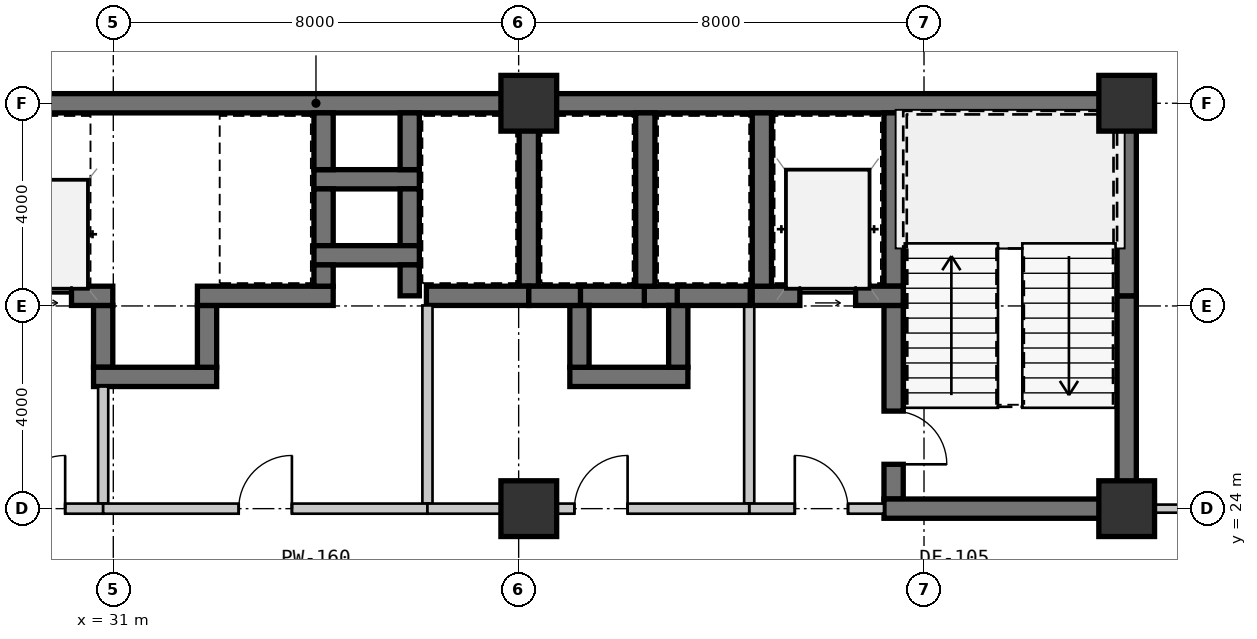
"""IFC4 building model, lengths in metres.
Left out: names, types, materials, properties, quantities, classifications, styles, units other than length and angle.
Written with IfcOpenShell. Run it as: python <this file> out.ifc"""

import sys

from ifc_helpers import new_model, si_unit, direction, frame, frame_2d, origin, origin_2d, place, context, subcontext, project, spatial, rectangle, extrude, source, transform, mapped, element, fill, save


model = new_model("IFC4")
c1 = context("Model", 3, precision=1e-05, world=origin(), true_north=direction((0.0, 1.0)))
c2 = subcontext(c1, "Body", "Model", "MODEL_VIEW")
j1 = project(units=[si_unit("LENGTHUNIT", "METRE"), si_unit("PLANEANGLEUNIT", "RADIAN")], contexts=[c1])
p1 = place(None, origin())
s1 = spatial("IfcSite", under=j1, at=p1, CompositionType="ELEMENT")
p2 = place(p1, origin())
s2 = spatial("IfcBuilding", under=s1, at=p2, CompositionType="ELEMENT")
p3 = place(p2, frame((0.0, 0.0, 16.8)))
s3 = spatial("IfcBuildingStorey", under=s2, at=p3, CompositionType="ELEMENT", Elevation=16.8)
m1 = source(origin(), c2, "Body", "SweptSolid", [
    extrude(rectangle(XDim=1.1, YDim=1.1, at=origin_2d()), origin(), (0.0, 0.0, 1.0), 3.15),
])
for number, where, z_axis, x_axis in (
    (1, (39.2, 24.0, 0.0), (0.0, 0.0, 1.0), (1.0, 0.0, 0.0)),
    (2, (51.0, 24.0, 0.0), (0.0, 0.0, 1.0), (1.0, 0.0, 0.0)),
    (3, (39.2, 32.0, 0.0), (0.0, 0.0, 1.0), (1.0, 0.0, 0.0)),
    (4, (51.0, 32.0, 0.0), (0.0, 0.0, 1.0), (1.0, 0.0, 0.0)),
):
    element("IfcColumn", number, at=place(p3, frame(where, z_axis=z_axis, x_axis=x_axis)), inside=s3, PredefinedType="COLUMN", context=c2, shape_type="MappedRepresentation", body=[
        mapped(m1, transform((0.0, 0.0, 0.0), scale=1.0)),
    ])
m2 = source(origin(), c2, "Body", "SweptSolid", [
    extrude(rectangle(XDim=11.2, YDim=0.38, at=frame_2d((5.6, 0.0))), origin(), (0.0, 0.0, 1.0), 2.93),
])
p4 = place(p3, frame((28.0, 32.0, 0.0), z_axis=(0.0, 0.0, 1.0), x_axis=(1.0, 0.0, 0.0)))
e5 = element("IfcWall", 5, at=p4, inside=s3, PredefinedType="SHEAR", context=c2, shape_type="MappedRepresentation", body=[
    mapped(m2, transform((0.0, 0.0, 0.0), scale=1.0)),
])
m3 = source(origin(), c2, "Body", "SweptSolid", [
    extrude(rectangle(XDim=11.99, YDim=0.38, at=frame_2d((5.995, 0.0))), origin(), (0.0, 0.0, 1.0), 2.93),
])
p5 = place(p3, frame((39.2, 32.0, 0.0), z_axis=(0.0, 0.0, 1.0), x_axis=(1.0, 0.0, 0.0)))
e6 = element("IfcWall", 6, at=p5, inside=s3, PredefinedType="SHEAR", context=c2, shape_type="MappedRepresentation", body=[
    mapped(m3, transform((0.0, 0.0, 0.0), scale=1.0)),
])
m4 = source(origin(), c2, "Body", "SweptSolid", [
    extrude(rectangle(XDim=4.01, YDim=0.38, at=frame_2d((2.005, 0.0))), origin(), (0.0, 0.0, 1.0), 2.93),
])
p6 = place(p3, frame((51.0, 24.19, 0.0), z_axis=(0.0, 0.0, 1.0), x_axis=(0.0, 1.0, 0.0)))
e7 = element("IfcWall", 7, at=p6, inside=s3, PredefinedType="SHEAR", context=c2, shape_type="MappedRepresentation", body=[
    mapped(m4, transform((0.0, 0.0, 0.0), scale=1.0)),
])
m5 = source(origin(), c2, "Body", "SweptSolid", [
    extrude(rectangle(XDim=3.61, YDim=0.38, at=frame_2d((1.805, 0.0))), origin(), (0.0, 0.0, 1.0), 2.93),
])
p7 = place(p3, frame((51.0, 28.2, 0.0), z_axis=(0.0, 0.0, 1.0), x_axis=(0.0, 1.0, 0.0)))
e8 = element("IfcWall", 8, at=p7, inside=s3, PredefinedType="SHEAR", context=c2, shape_type="MappedRepresentation", body=[
    mapped(m5, transform((0.0, 0.0, 0.0), scale=1.0)),
])
m6 = source(origin(), c2, "Body", "SweptSolid", [
    extrude(rectangle(XDim=3.42, YDim=0.38, at=frame_2d((1.71, 0.0))), origin(), (0.0, 0.0, 1.0), 2.93),
])
p8 = place(p3, frame((46.4, 31.81, 0.0), z_axis=(0.0, 0.0, 1.0), x_axis=(0.0, -1.0, 0.0)))
e9 = element("IfcWall", 9, at=p8, inside=s3, PredefinedType="SHEAR", context=c2, shape_type="MappedRepresentation", body=[
    mapped(m6, transform((0.0, 0.0, 0.0), scale=1.0)),
])
m7 = source(origin(), c2, "Body", "SweptSolid", [
    extrude(rectangle(XDim=3.82, YDim=0.38, at=frame_2d((1.91, 0.0))), origin(), (0.0, 0.0, 1.0), 2.93),
])
p9 = place(p3, frame((46.4, 28.01, 0.0), z_axis=(0.0, 0.0, 1.0), x_axis=(0.0, -1.0, 0.0)))
e10 = element("IfcWall", 10, at=p9, inside=s3, PredefinedType="SHEAR", context=c2, shape_type="MappedRepresentation", body=[
    mapped(m7, transform((0.0, 0.0, 0.0), scale=1.0)),
])
m8 = source(origin(), c2, "Body", "SweptSolid", [
    extrude(rectangle(XDim=1.05, YDim=2.1, at=frame_2d((0.525, 1.05))), frame((0.0, 0.2, 0.0), z_axis=(0.0, -1.0, 0.0), x_axis=(1.0, 0.0, 0.0)), (0.0, 0.0, 1.0), 0.4),
])
p10 = place(p9, frame((2.085, 0.0, 0.0)))
e11 = element("IfcOpeningElement", 11, at=p10, cuts=e10, PredefinedType="OPENING", context=c2, shape_type="MappedRepresentation", body=[
    mapped(m8, transform((0.0, 0.0, 0.0), scale=1.0)),
])
m9 = source(origin(), c2, "Body", "SweptSolid", [
    extrude(rectangle(XDim=4.98, YDim=0.38, at=frame_2d((2.49, 0.0))), origin(), (0.0, 0.0, 1.0), 2.93),
])
p11 = place(p3, frame((46.21, 24.0, 0.0), z_axis=(0.0, 0.0, 1.0), x_axis=(1.0, 0.0, 0.0)))
e12 = element("IfcWall", 12, at=p11, inside=s3, PredefinedType="SHEAR", context=c2, shape_type="MappedRepresentation", body=[
    mapped(m9, transform((0.0, 0.0, 0.0), scale=1.0)),
])
m10 = source(origin(), c2, "Body", "SweptSolid", [
    extrude(rectangle(XDim=2.98, YDim=0.38, at=frame_2d((1.49, 0.0))), origin(), (0.0, 0.0, 1.0), 2.93),
])
p12 = place(p3, frame((43.61, 28.2, 0.0), z_axis=(0.0, 0.0, 1.0), x_axis=(1.0, 0.0, 0.0)))
e13 = element("IfcWall", 13, at=p12, inside=s3, PredefinedType="SHEAR", context=c2, shape_type="MappedRepresentation", body=[
    mapped(m10, transform((0.0, 0.0, 0.0), scale=1.0)),
])
m11 = source(origin(), c2, "Body", "SweptSolid", [
    extrude(rectangle(XDim=1.1, YDim=2.15, at=frame_2d((0.55, 1.075))), frame((0.0, 0.2, 0.0), z_axis=(0.0, -1.0, 0.0), x_axis=(1.0, 0.0, 0.0)), (0.0, 0.0, 1.0), 0.4),
])
p13 = place(p12, frame((0.94, 0.0, 0.0)))
e14 = element("IfcOpeningElement", 14, at=p13, cuts=e13, PredefinedType="OPENING", context=c2, shape_type="MappedRepresentation", body=[
    mapped(m11, transform((0.0, 0.0, 0.0), scale=1.0)),
])
p14 = place(p3, frame((43.8, 31.81, 0.0), z_axis=(0.0, 0.0, 1.0), x_axis=(0.0, -1.0, 0.0)))
e15 = element("IfcWall", 15, at=p14, inside=s3, PredefinedType="SHEAR", context=c2, shape_type="MappedRepresentation", body=[
    mapped(m6, transform((0.0, 0.0, 0.0), scale=1.0)),
])
m12 = source(origin(), c2, "Body", "SweptSolid", [
    extrude(rectangle(XDim=3.91, YDim=0.2, at=frame_2d((1.955, 0.0))), origin(), (0.0, 0.0, 1.0), 2.93),
])
p15 = place(p3, frame((43.55, 28.01, 0.0), z_axis=(0.0, 0.0, 1.0), x_axis=(0.0, -1.0, 0.0)))
e16 = element("IfcWall", 16, at=p15, inside=s3, PredefinedType="SOLIDWALL", context=c2, shape_type="MappedRepresentation", body=[
    mapped(m12, transform((0.0, 0.0, 0.0), scale=1.0)),
])
m13 = source(origin(), c2, "Body", "SweptSolid", [
    extrude(rectangle(XDim=2.66, YDim=0.2, at=frame_2d((1.33, 0.0))), origin(), (0.0, 0.0, 1.0), 2.397),
])
p16 = place(p3, frame((43.55, 24.0, 0.0), z_axis=(0.0, 0.0, 1.0), x_axis=(1.0, 0.0, 0.0)))
e17 = element("IfcWall", 17, at=p16, inside=s3, PredefinedType="SOLIDWALL", context=c2, shape_type="MappedRepresentation", body=[
    mapped(m13, transform((0.0, 0.0, 0.0), scale=1.0)),
])
m14 = source(origin(), c2, "Body", "SweptSolid", [
    extrude(rectangle(XDim=1.05, YDim=2.1, at=frame_2d((0.525, 1.05))), frame((0.0, 0.11, 0.0), z_axis=(0.0, -1.0, 0.0), x_axis=(1.0, 0.0, 0.0)), (0.0, 0.0, 1.0), 0.22),
])
p17 = place(p16, frame((0.9, 0.0, 0.0)))
e18 = element("IfcOpeningElement", 18, at=p17, cuts=e17, PredefinedType="OPENING", context=c2, shape_type="MappedRepresentation", body=[
    mapped(m14, transform((0.0, 0.0, 0.0), scale=1.0)),
])
m15 = source(origin(), c2, "Body", "SweptSolid", [
    extrude(rectangle(XDim=2.08, YDim=0.38, at=frame_2d((1.04, 0.0))), origin(), (0.0, 0.0, 1.0), 2.93),
])
p18 = place(p3, frame((34.96, 30.5, 0.0), z_axis=(0.0, 0.0, 1.0), x_axis=(1.0, 0.0, 0.0)))
e19 = element("IfcWall", 19, at=p18, inside=s3, PredefinedType="SHEAR", context=c2, shape_type="MappedRepresentation", body=[
    mapped(m15, transform((0.0, 0.0, 0.0), scale=1.0)),
])
m16 = source(origin(), c2, "Body", "SweptSolid", [
    extrude(rectangle(XDim=1.12, YDim=0.38, at=frame_2d((0.56, 0.0))), origin(), (0.0, 0.0, 1.0), 2.93),
])
for number, where, z_axis, x_axis in (
    (20, (35.15, 31.81, 0.0), (0.0, 0.0, 1.0), (0.0, -1.0, 0.0)),
    (21, (36.85, 30.69, 0.0), (0.0, 0.0, 1.0), (0.0, 1.0, 0.0)),
    (22, (35.15, 30.31, 0.0), (0.0, 0.0, 1.0), (0.0, -1.0, 0.0)),
    (23, (36.85, 29.19, 0.0), (0.0, 0.0, 1.0), (0.0, 1.0, 0.0)),
):
    element("IfcWall", number, at=place(p3, frame(where, z_axis=z_axis, x_axis=x_axis)), inside=s3, PredefinedType="SHEAR", context=c2, shape_type="MappedRepresentation", body=[
        mapped(m16, transform((0.0, 0.0, 0.0), scale=1.0)),
    ])
p19 = place(p3, frame((34.96, 29.0, 0.0), z_axis=(0.0, 0.0, 1.0), x_axis=(1.0, 0.0, 0.0)))
e24 = element("IfcWall", 24, at=p19, inside=s3, PredefinedType="SHEAR", context=c2, shape_type="MappedRepresentation", body=[
    mapped(m15, transform((0.0, 0.0, 0.0), scale=1.0)),
])
m17 = source(origin(), c2, "Body", "SweptSolid", [
    extrude(rectangle(XDim=1.22, YDim=0.38, at=frame_2d((0.61, 0.0))), origin(), (0.0, 0.0, 1.0), 2.93),
])
p20 = place(p3, frame((30.8, 28.01, 0.0), z_axis=(0.0, 0.0, 1.0), x_axis=(0.0, -1.0, 0.0)))
e25 = element("IfcWall", 25, at=p20, inside=s3, PredefinedType="SHEAR", context=c2, shape_type="MappedRepresentation", body=[
    mapped(m17, transform((0.0, 0.0, 0.0), scale=1.0)),
])
m18 = source(origin(), c2, "Body", "SweptSolid", [
    extrude(rectangle(XDim=2.43, YDim=0.38, at=frame_2d((1.215, 0.0))), origin(), (0.0, 0.0, 1.0), 2.93),
])
p21 = place(p3, frame((30.61, 26.6, 0.0), z_axis=(0.0, 0.0, 1.0), x_axis=(1.0, 0.0, 0.0)))
e26 = element("IfcWall", 26, at=p21, inside=s3, PredefinedType="SHEAR", context=c2, shape_type="MappedRepresentation", body=[
    mapped(m18, transform((0.0, 0.0, 0.0), scale=1.0)),
])
p22 = place(p3, frame((32.85, 26.79, 0.0), z_axis=(0.0, 0.0, 1.0), x_axis=(0.0, 1.0, 0.0)))
e27 = element("IfcWall", 27, at=p22, inside=s3, PredefinedType="SHEAR", context=c2, shape_type="MappedRepresentation", body=[
    mapped(m17, transform((0.0, 0.0, 0.0), scale=1.0)),
])
m19 = source(origin(), c2, "Body", "SweptSolid", [
    extrude(rectangle(XDim=1.32, YDim=0.38, at=frame_2d((0.66, 0.0))), origin(), (0.0, 0.0, 1.0), 2.93),
])
p23 = place(p3, frame((41.52, 28.2, 0.0), z_axis=(0.0, 0.0, 1.0), x_axis=(-1.0, 0.0, 0.0)))
e28 = element("IfcWall", 28, at=p23, inside=s3, PredefinedType="SHEAR", context=c2, shape_type="MappedRepresentation", body=[
    mapped(m19, transform((0.0, 0.0, 0.0), scale=1.0)),
])
m20 = source(origin(), c2, "Body", "SweptSolid", [
    extrude(rectangle(XDim=0.67, YDim=0.38, at=frame_2d((0.335, 0.0))), origin(), (0.0, 0.0, 1.0), 2.93),
])
p24 = place(p3, frame((42.15, 28.2, 0.0), z_axis=(0.0, 0.0, 1.0), x_axis=(-1.0, 0.0, 0.0)))
e29 = element("IfcWall", 29, at=p24, inside=s3, PredefinedType="SHEAR", context=c2, shape_type="MappedRepresentation", body=[
    mapped(m20, transform((0.0, 0.0, 0.0), scale=1.0)),
])
m21 = source(origin(), c2, "Body", "SweptSolid", [
    extrude(rectangle(XDim=2.33, YDim=0.38, at=frame_2d((1.165, 0.0))), origin(), (0.0, 0.0, 1.0), 2.93),
])
p25 = place(p3, frame((40.01, 26.6, 0.0), z_axis=(0.0, 0.0, 1.0), x_axis=(1.0, 0.0, 0.0)))
e30 = element("IfcWall", 30, at=p25, inside=s3, PredefinedType="SHEAR", context=c2, shape_type="MappedRepresentation", body=[
    mapped(m21, transform((0.0, 0.0, 0.0), scale=1.0)),
])
for number, where, z_axis, x_axis in (
    (31, (40.2, 28.01, 0.0), (0.0, 0.0, 1.0), (0.0, -1.0, 0.0)),
    (32, (42.15, 26.79, 0.0), (0.0, 0.0, 1.0), (0.0, 1.0, 0.0)),
):
    element("IfcWall", number, at=place(p3, frame(where, z_axis=z_axis, x_axis=x_axis)), inside=s3, PredefinedType="SHEAR", context=c2, shape_type="MappedRepresentation", body=[
        mapped(m17, transform((0.0, 0.0, 0.0), scale=1.0)),
    ])
m22 = source(origin(), c2, "Body", "SweptSolid", [
    extrude(rectangle(XDim=2.49, YDim=0.38, at=frame_2d((1.245, 0.0))), origin(), (0.0, 0.0, 1.0), 2.93),
])
p26 = place(p3, frame((28.5, 28.2, 0.0), z_axis=(0.0, 0.0, 1.0), x_axis=(1.0, 0.0, 0.0)))
e33 = element("IfcWall", 33, at=p26, inside=s3, PredefinedType="SHEAR", context=c2, shape_type="MappedRepresentation", body=[
    mapped(m22, transform((0.0, 0.0, 0.0), scale=1.0)),
])
m23 = source(origin(), c2, "Body", "SweptSolid", [
    extrude(rectangle(XDim=1.05, YDim=2.15, at=frame_2d((0.525, 1.075))), frame((0.0, 0.2, 0.0), z_axis=(0.0, -1.0, 0.0), x_axis=(1.0, 0.0, 0.0)), (0.0, 0.0, 1.0), 0.4),
])
p27 = place(p26, frame((0.625, 0.0, 0.0)))
e34 = element("IfcOpeningElement", 34, at=p27, cuts=e33, PredefinedType="OPENING", context=c2, shape_type="MappedRepresentation", body=[
    mapped(m23, transform((0.0, 0.0, 0.0), scale=1.0)),
])
m24 = source(origin(), c2, "Body", "SweptSolid", [
    extrude(rectangle(XDim=2.31, YDim=0.2, at=frame_2d((1.155, 0.0))), origin(), (0.0, 0.0, 1.0), 2.93),
])
p28 = place(p3, frame((30.8, 26.41, 0.0), z_axis=(0.0, 0.0, 1.0), x_axis=(0.0, -1.0, 0.0)))
e35 = element("IfcWall", 35, at=p28, inside=s3, PredefinedType="SOLIDWALL", context=c2, shape_type="MappedRepresentation", body=[
    mapped(m24, transform((0.0, 0.0, 0.0), scale=1.0)),
])
m25 = source(origin(), c2, "Body", "SweptSolid", [
    extrude(rectangle(XDim=4.35, YDim=0.2, at=frame_2d((2.175, 0.0))), origin(), (0.0, 0.0, 1.0), 2.47),
])
p29 = place(p3, frame((30.8, 24.0, 0.0), z_axis=(0.0, 0.0, 1.0), x_axis=(-1.0, 0.0, 0.0)))
e36 = element("IfcWall", 36, at=p29, inside=s3, PredefinedType="SOLIDWALL", context=c2, shape_type="MappedRepresentation", body=[
    mapped(m25, transform((0.0, 0.0, 0.0), scale=1.0)),
])
p30 = place(p29, frame((0.75, 0.0, 0.0)))
e37 = element("IfcOpeningElement", 37, at=p30, cuts=e36, PredefinedType="OPENING", context=c2, shape_type="MappedRepresentation", body=[
    mapped(m14, transform((0.0, 0.0, 0.0), scale=1.0)),
])
m26 = source(origin(), c2, "Body", "SweptSolid", [
    extrude(rectangle(XDim=2.68, YDim=0.38, at=frame_2d((1.34, 0.0))), origin(), (0.0, 0.0, 1.0), 2.93),
])
p31 = place(p3, frame((32.66, 28.2, 0.0), z_axis=(0.0, 0.0, 1.0), x_axis=(1.0, 0.0, 0.0)))
e38 = element("IfcWall", 38, at=p31, inside=s3, PredefinedType="SHEAR", context=c2, shape_type="MappedRepresentation", body=[
    mapped(m26, transform((0.0, 0.0, 0.0), scale=1.0)),
])
m27 = source(origin(), c2, "Body", "SweptSolid", [
    extrude(rectangle(XDim=0.42, YDim=0.38, at=frame_2d((0.21, 0.0))), origin(), (0.0, 0.0, 1.0), 2.93),
])
p32 = place(p3, frame((35.15, 28.39, 0.0), z_axis=(0.0, 0.0, 1.0), x_axis=(0.0, 1.0, 0.0)))
e39 = element("IfcWall", 39, at=p32, inside=s3, PredefinedType="SHEAR", context=c2, shape_type="MappedRepresentation", body=[
    mapped(m27, transform((0.0, 0.0, 0.0), scale=1.0)),
])
p33 = place(p3, frame((39.2, 28.39, 0.0), z_axis=(0.0, 0.0, 1.0), x_axis=(0.0, 1.0, 0.0)))
e40 = element("IfcWall", 40, at=p33, inside=s3, PredefinedType="SHEAR", context=c2, shape_type="MappedRepresentation", body=[
    mapped(m6, transform((0.0, 0.0, 0.0), scale=1.0)),
])
m28 = source(origin(), c2, "Body", "SweptSolid", [
    extrude(rectangle(XDim=0.61, YDim=0.38, at=frame_2d((0.305, 0.0))), origin(), (0.0, 0.0, 1.0), 2.93),
])
p34 = place(p3, frame((36.85, 28.81, 0.0), z_axis=(0.0, 0.0, 1.0), x_axis=(0.0, -1.0, 0.0)))
e41 = element("IfcWall", 41, at=p34, inside=s3, PredefinedType="SHEAR", context=c2, shape_type="MappedRepresentation", body=[
    mapped(m28, transform((0.0, 0.0, 0.0), scale=1.0)),
])
m29 = source(origin(), c2, "Body", "SweptSolid", [
    extrude(rectangle(XDim=2.02, YDim=0.38, at=frame_2d((1.01, 0.0))), origin(), (0.0, 0.0, 1.0), 2.93),
])
p35 = place(p3, frame((37.18, 28.2, 0.0), z_axis=(0.0, 0.0, 1.0), x_axis=(1.0, 0.0, 0.0)))
e42 = element("IfcWall", 42, at=p35, inside=s3, PredefinedType="SHEAR", context=c2, shape_type="MappedRepresentation", body=[
    mapped(m29, transform((0.0, 0.0, 0.0), scale=1.0)),
])
p36 = place(p3, frame((41.5, 28.39, 0.0), z_axis=(0.0, 0.0, 1.0), x_axis=(0.0, 1.0, 0.0)))
e43 = element("IfcWall", 43, at=p36, inside=s3, PredefinedType="SHEAR", context=c2, shape_type="MappedRepresentation", body=[
    mapped(m6, transform((0.0, 0.0, 0.0), scale=1.0)),
])
m30 = source(origin(), c2, "Body", "SweptSolid", [
    extrude(rectangle(XDim=1.02, YDim=0.38, at=frame_2d((0.51, 0.0))), origin(), (0.0, 0.0, 1.0), 2.93),
])
p37 = place(p3, frame((39.2, 28.2, 0.0), z_axis=(0.0, 0.0, 1.0), x_axis=(1.0, 0.0, 0.0)))
e44 = element("IfcWall", 44, at=p37, inside=s3, PredefinedType="SHEAR", context=c2, shape_type="MappedRepresentation", body=[
    mapped(m30, transform((0.0, 0.0, 0.0), scale=1.0)),
])
m31 = source(origin(), c2, "Body", "SweptSolid", [
    extrude(rectangle(XDim=1.44, YDim=0.38, at=frame_2d((0.72, 0.0))), origin(), (0.0, 0.0, 1.0), 2.93),
])
p38 = place(p3, frame((42.13, 28.2, 0.0), z_axis=(0.0, 0.0, 1.0), x_axis=(1.0, 0.0, 0.0)))
e45 = element("IfcWall", 45, at=p38, inside=s3, PredefinedType="SHEAR", context=c2, shape_type="MappedRepresentation", body=[
    mapped(m31, transform((0.0, 0.0, 0.0), scale=1.0)),
])
p39 = place(p3, frame((37.2, 28.01, 0.0), z_axis=(0.0, 0.0, 1.0), x_axis=(0.0, -1.0, 0.0)))
e46 = element("IfcWall", 46, at=p39, inside=s3, PredefinedType="SOLIDWALL", context=c2, shape_type="MappedRepresentation", body=[
    mapped(m12, transform((0.0, 0.0, 0.0), scale=1.0)),
])
m32 = source(origin(), c2, "Body", "SweptSolid", [
    extrude(rectangle(XDim=6.4, YDim=0.2, at=frame_2d((3.2, 0.0))), origin(), (0.0, 0.0, 1.0), 2.47),
])
p40 = place(p3, frame((37.2, 24.0, 0.0), z_axis=(0.0, 0.0, 1.0), x_axis=(-1.0, 0.0, 0.0)))
e47 = element("IfcWall", 47, at=p40, inside=s3, PredefinedType="SOLIDWALL", context=c2, shape_type="MappedRepresentation", body=[
    mapped(m32, transform((0.0, 0.0, 0.0), scale=1.0)),
])
p41 = place(p40, frame((2.675, 0.0, 0.0)))
e48 = element("IfcOpeningElement", 48, at=p41, cuts=e47, PredefinedType="OPENING", context=c2, shape_type="MappedRepresentation", body=[
    mapped(m14, transform((0.0, 0.0, 0.0), scale=1.0)),
])
m33 = source(origin(), c2, "Body", "SweptSolid", [
    extrude(rectangle(XDim=4.35, YDim=0.2, at=frame_2d((2.175, 0.0))), origin(), (0.0, 0.0, 1.0), 2.397),
])
p42 = place(p3, frame((43.55, 24.0, 0.0), z_axis=(0.0, 0.0, 1.0), x_axis=(-1.0, 0.0, 0.0)))
e49 = element("IfcWall", 49, at=p42, inside=s3, PredefinedType="SOLIDWALL", context=c2, shape_type="MappedRepresentation", body=[
    mapped(m33, transform((0.0, 0.0, 0.0), scale=1.0)),
])
p43 = place(p42, frame((2.4, 0.0, 0.0)))
e50 = element("IfcOpeningElement", 50, at=p43, cuts=e49, PredefinedType="OPENING", context=c2, shape_type="MappedRepresentation", body=[
    mapped(m14, transform((0.0, 0.0, 0.0), scale=1.0)),
])
m34 = source(origin(), c2, "Body", "SweptSolid", [
    extrude(rectangle(XDim=2.0, YDim=0.2, at=frame_2d((1.0, 0.0))), origin(), (0.0, 0.0, 1.0), 2.47),
])
p44 = place(p3, frame((39.2, 24.0, 0.0), z_axis=(0.0, 0.0, 1.0), x_axis=(-1.0, 0.0, 0.0)))
e51 = element("IfcWall", 51, at=p44, inside=s3, PredefinedType="SOLIDWALL", context=c2, shape_type="MappedRepresentation", body=[
    mapped(m34, transform((0.0, 0.0, 0.0), scale=1.0)),
])
m35 = source(origin(), c2, "Body", "SweptSolid", [
    extrude(rectangle(XDim=4.13, YDim=0.16, at=frame_2d((2.065, 0.0))), origin(), (0.0, 0.0, 1.0), 2.93),
])
p45 = place(p3, frame((51.19, 24.0, 0.0), z_axis=(0.0, 0.0, 1.0), x_axis=(1.0, 0.0, 0.0)))
e52 = element("IfcWall", 52, at=p45, inside=s3, PredefinedType="PARTITIONING", context=c2, shape_type="MappedRepresentation", body=[
    mapped(m35, transform((0.0, 0.0, 0.0), scale=1.0)),
])
m36 = source(origin(), c2, "Body", "SweptSolid", [
    extrude(rectangle(XDim=1.05, YDim=2.1, at=frame_2d((0.525, 1.05))), frame((0.0, 0.025, 0.0), z_axis=(0.0, -1.0, 0.0), x_axis=(1.0, 0.0, 0.0)), (0.0, 0.0, 1.0), 0.05),
])
p46 = place(p10, origin())
e53 = element("IfcDoor", 53, at=p46, inside=s3, OperationType="SINGLE_SWING_RIGHT", PredefinedType="DOOR", context=c2, shape_type="MappedRepresentation", body=[
    mapped(m36, transform((0.0, 0.0, 0.0), scale=1.0)),
])
fill(e11, e53)
m37 = source(origin(), c2, "Body", "SweptSolid", [
    extrude(rectangle(XDim=1.1, YDim=2.15, at=frame_2d((0.55, 1.075))), frame((0.0, 0.025, 0.0), z_axis=(0.0, -1.0, 0.0), x_axis=(1.0, 0.0, 0.0)), (0.0, 0.0, 1.0), 0.05),
])
p47 = place(p13, origin())
e54 = element("IfcDoor", 54, at=p47, inside=s3, OperationType="SLIDING_TO_LEFT", PredefinedType="DOOR", context=c2, shape_type="MappedRepresentation", body=[
    mapped(m37, transform((0.0, 0.0, 0.0), scale=1.0)),
])
fill(e14, e54)
p48 = place(p17, origin())
e55 = element("IfcDoor", 55, at=p48, inside=s3, OperationType="SINGLE_SWING_LEFT", PredefinedType="DOOR", context=c2, shape_type="MappedRepresentation", body=[
    mapped(m36, transform((0.0, 0.0, 0.0), scale=1.0)),
])
fill(e18, e55)
m38 = source(origin(), c2, "Body", "SweptSolid", [
    extrude(rectangle(XDim=1.05, YDim=2.15, at=frame_2d((0.525, 1.075))), frame((0.0, 0.025, 0.0), z_axis=(0.0, -1.0, 0.0), x_axis=(1.0, 0.0, 0.0)), (0.0, 0.0, 1.0), 0.05),
])
p49 = place(p27, origin())
e56 = element("IfcDoor", 56, at=p49, inside=s3, OperationType="SLIDING_TO_LEFT", PredefinedType="DOOR", context=c2, shape_type="MappedRepresentation", body=[
    mapped(m38, transform((0.0, 0.0, 0.0), scale=1.0)),
])
fill(e34, e56)
p50 = place(p30, frame((1.05, 0.0, 0.0), z_axis=(0.0, 0.0, 1.0), x_axis=(-1.0, 0.0, 0.0)))
e57 = element("IfcDoor", 57, at=p50, inside=s3, OperationType="SINGLE_SWING_RIGHT", PredefinedType="DOOR", context=c2, shape_type="MappedRepresentation", body=[
    mapped(m36, transform((0.0, 0.0, 0.0), scale=1.0)),
])
fill(e37, e57)
p51 = place(p41, frame((1.05, 0.0, 0.0), z_axis=(0.0, 0.0, 1.0), x_axis=(-1.0, 0.0, 0.0)))
e58 = element("IfcDoor", 58, at=p51, inside=s3, OperationType="SINGLE_SWING_RIGHT", PredefinedType="DOOR", context=c2, shape_type="MappedRepresentation", body=[
    mapped(m36, transform((0.0, 0.0, 0.0), scale=1.0)),
])
fill(e48, e58)
p52 = place(p43, frame((1.05, 0.0, 0.0), z_axis=(0.0, 0.0, 1.0), x_axis=(-1.0, 0.0, 0.0)))
e59 = element("IfcDoor", 59, at=p52, inside=s3, OperationType="SINGLE_SWING_RIGHT", PredefinedType="DOOR", context=c2, shape_type="MappedRepresentation", body=[
    mapped(m36, transform((0.0, 0.0, 0.0), scale=1.0)),
])
fill(e50, e59)
save(model, sys.argv[1])
